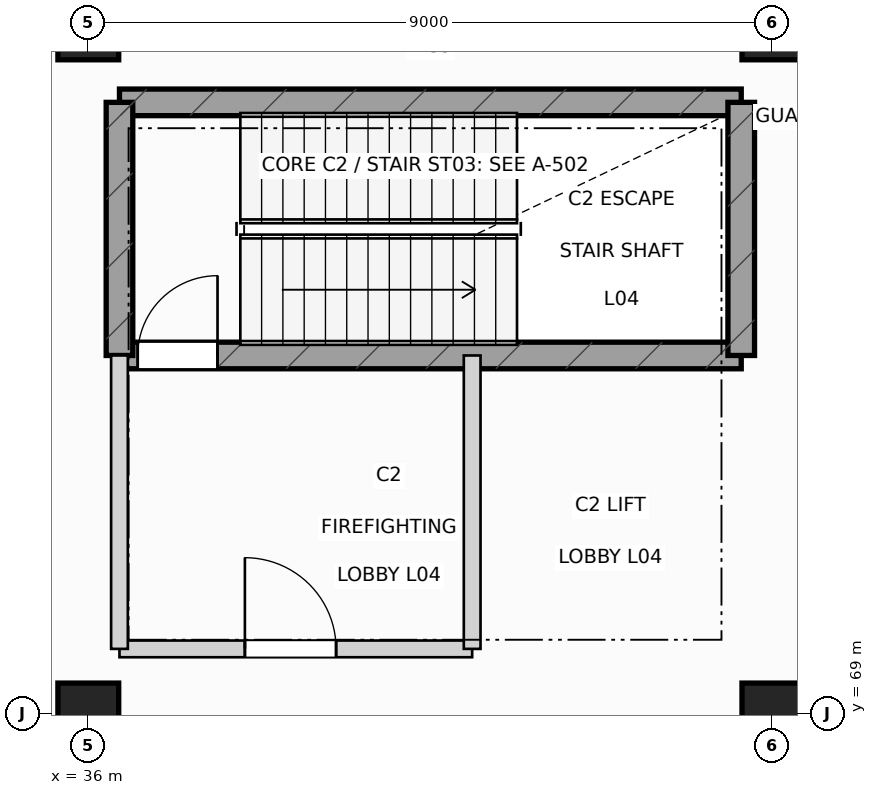
"""IFC4 building model, lengths in metres.
Left out: names, types, materials, properties, quantities, classifications, styles, units other than length and angle.
Written with IfcOpenShell. Run it as: python <this file> out.ifc"""

import sys

from ifc_helpers import new_model, si_unit, direction, frame, frame_2d, origin, origin_2d, place, context, subcontext, project, spatial, rectangle, extrude, element, fill, save


model = new_model("IFC4")
c1 = context("Model", 3, precision=1e-05, world=origin(), true_north=direction((0.0, 1.0)))
c2 = subcontext(c1, "Body", "Model", "MODEL_VIEW")
j1 = project(units=[si_unit("LENGTHUNIT", "METRE"), si_unit("PLANEANGLEUNIT", "RADIAN")], contexts=[c1])
p1 = place(None, origin())
s1 = spatial("IfcSite", under=j1, at=p1, CompositionType="ELEMENT")
p2 = place(p1, origin())
s2 = spatial("IfcBuilding", under=s1, at=p2, CompositionType="ELEMENT")
p3 = place(p2, frame((0.0, 0.0, 21.6)))
s3 = spatial("IfcBuildingStorey", under=s2, at=p3, CompositionType="ELEMENT", Elevation=21.6)
for number, where, z_axis, x_axis in (
    (1, (36.0, 69.0, 0.0), (0.0, 0.0, 1.0), (1.0, 0.0, 0.0)),
    (2, (36.0, 78.0, 0.0), (0.0, 0.0, 1.0), (1.0, 0.0, 0.0)),
    (3, (45.0, 69.0, 0.0), (0.0, 0.0, 1.0), (1.0, 0.0, 0.0)),
    (4, (45.0, 78.0, 0.0), (0.0, 0.0, 1.0), (1.0, 0.0, 0.0)),
):
    element("IfcColumn", number, at=place(p3, frame(where, z_axis=z_axis, x_axis=x_axis)), inside=s3, PredefinedType="COLUMN", context=c2, shape_type="SweptSolid", body=[
        extrude(rectangle(XDim=0.8, YDim=0.8, at=origin_2d()), origin(), (0.0, 0.0, 1.0), 4.8),
    ])
p4 = place(p3, frame((36.41, 73.71, 0.0), z_axis=(0.0, 0.0, 1.0), x_axis=(1.0, 0.0, 0.0)))
e5 = element("IfcWall", 5, at=p4, inside=s3, PredefinedType="SHEAR", context=c2, shape_type="SweptSolid", body=[
    extrude(rectangle(XDim=8.18, YDim=0.35, at=frame_2d((4.09, 0.0))), origin(), (0.0, 0.0, 1.0), 4.54),
])
p5 = place(p4, frame((0.24, 0.0, 0.0)))
e6 = element("IfcOpeningElement", 6, at=p5, cuts=e5, PredefinedType="OPENING", context=c2, shape_type="SweptSolid", body=[
    extrude(rectangle(XDim=1.05, YDim=2.18, at=frame_2d((0.525, 1.09))), frame((0.0, 0.185, 0.0), z_axis=(0.0, -1.0, 0.0), x_axis=(1.0, 0.0, 0.0)), (0.0, 0.0, 1.0), 0.37),
])
p6 = place(p3, frame((36.41, 77.04, 0.0), z_axis=(0.0, 0.0, 1.0), x_axis=(1.0, 0.0, 0.0)))
e7 = element("IfcWall", 7, at=p6, inside=s3, PredefinedType="SHEAR", context=c2, shape_type="SweptSolid", body=[
    extrude(rectangle(XDim=8.18, YDim=0.35, at=frame_2d((4.09, 0.0))), origin(), (0.0, 0.0, 1.0), 4.54),
])
for number, where, z_axis, x_axis in (
    (8, (36.41, 73.71, 0.0), (0.0, 0.0, 1.0), (0.0, 1.0, 0.0)),
    (9, (44.59, 73.71, 0.0), (0.0, 0.0, 1.0), (0.0, 1.0, 0.0)),
):
    element("IfcWall", number, at=place(p3, frame(where, z_axis=z_axis, x_axis=x_axis)), inside=s3, PredefinedType="SHEAR", context=c2, shape_type="SweptSolid", body=[
        extrude(rectangle(XDim=3.33, YDim=0.35, at=frame_2d((1.665, 0.0))), origin(), (0.0, 0.0, 1.0), 4.54),
    ])
p7 = place(p3, frame((36.41, 69.85, 0.0), z_axis=(0.0, 0.0, 1.0), x_axis=(1.0, 0.0, 0.0)))
e10 = element("IfcWall", 10, at=p7, inside=s3, PredefinedType="PARTITIONING", context=c2, shape_type="SweptSolid", body=[
    extrude(rectangle(XDim=4.64, YDim=0.22, at=frame_2d((2.32, 0.0))), origin(), (0.0, 0.0, 1.0), 4.005),
])
p8 = place(p7, frame((1.65, 0.0, 0.0)))
e11 = element("IfcOpeningElement", 11, at=p8, cuts=e10, PredefinedType="OPENING", context=c2, shape_type="SweptSolid", body=[
    extrude(rectangle(XDim=1.2, YDim=2.18, at=frame_2d((0.6, 1.09))), frame((0.0, 0.12, 0.0), z_axis=(0.0, -1.0, 0.0), x_axis=(1.0, 0.0, 0.0)), (0.0, 0.0, 1.0), 0.24),
])
p9 = place(p3, frame((36.41, 69.85, 0.0), z_axis=(0.0, 0.0, 1.0), x_axis=(0.0, 1.0, 0.0)))
e12 = element("IfcWall", 12, at=p9, inside=s3, PredefinedType="PARTITIONING", context=c2, shape_type="SweptSolid", body=[
    extrude(rectangle(XDim=3.86, YDim=0.22, at=frame_2d((1.93, 0.0))), origin(), (0.0, 0.0, 1.0), 4.005),
])
p10 = place(p3, frame((41.05, 69.85, 0.0), z_axis=(0.0, 0.0, 1.0), x_axis=(0.0, 1.0, 0.0)))
e13 = element("IfcWall", 13, at=p10, inside=s3, PredefinedType="PARTITIONING", context=c2, shape_type="SweptSolid", body=[
    extrude(rectangle(XDim=3.86, YDim=0.22, at=frame_2d((1.93, 0.0))), origin(), (0.0, 0.0, 1.0), 4.175),
])
p11 = place(p5, origin())
e14 = element("IfcDoor", 14, at=p11, inside=s3, OperationType="SINGLE_SWING_RIGHT", PredefinedType="DOOR", context=c2, shape_type="SweptSolid", body=[
    extrude(rectangle(XDim=1.05, YDim=2.18, at=frame_2d((0.525, 1.09))), frame((0.0, 0.025, 0.0), z_axis=(0.0, -1.0, 0.0), x_axis=(1.0, 0.0, 0.0)), (0.0, 0.0, 1.0), 0.05),
])
fill(e6, e14)
p12 = place(p8, origin())
e15 = element("IfcDoor", 15, at=p12, inside=s3, OperationType="SINGLE_SWING_LEFT", PredefinedType="DOOR", context=c2, shape_type="SweptSolid", body=[
    extrude(rectangle(XDim=1.2, YDim=2.18, at=frame_2d((0.6, 1.09))), frame((0.0, 0.025, 0.0), z_axis=(0.0, -1.0, 0.0), x_axis=(1.0, 0.0, 0.0)), (0.0, 0.0, 1.0), 0.05),
])
fill(e11, e15)
save(model, sys.argv[1])
